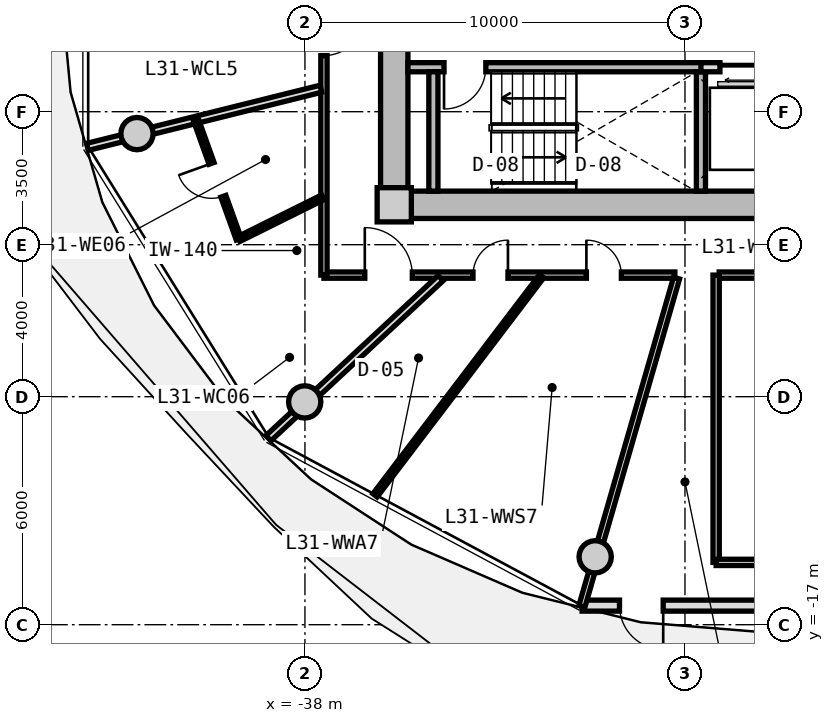
"""IFC4 building model, lengths in metres.
Left out: names, types, materials, properties, quantities, classifications, styles, units other than length and angle.
Written with IfcOpenShell. Run it as: python <this file> out.ifc"""

import sys

from ifc_helpers import new_model, si_unit, direction, frame, frame_2d, origin, origin_2d, place, context, subcontext, project, spatial, rectangle, circle, extrude, source, transform, mapped, element, fill, save


model = new_model("IFC4")
c1 = context("Model", 3, precision=1e-05, world=origin(), true_north=direction((0.0, 1.0)))
c2 = subcontext(c1, "Body", "Model", "MODEL_VIEW")
j1 = project(units=[si_unit("LENGTHUNIT", "METRE"), si_unit("PLANEANGLEUNIT", "RADIAN")], contexts=[c1])
p1 = place(None, origin())
s1 = spatial("IfcSite", under=j1, at=p1, CompositionType="ELEMENT")
p2 = place(p1, origin())
s2 = spatial("IfcBuilding", under=s1, at=p2, CompositionType="ELEMENT")
p3 = place(p2, frame((0.0, 0.0, 102.35)))
s3 = spatial("IfcBuildingStorey", under=s2, at=p3, CompositionType="ELEMENT", Elevation=102.35)
m1 = source(origin(), c2, "Body", "SweptSolid", [
    extrude(rectangle(XDim=0.9, YDim=0.9, at=origin_2d()), origin(), (0.0, 0.0, 1.0), 3.05),
])
p4 = place(p3, frame((-35.65, -5.95, 0.0), z_axis=(0.0, 0.0, 1.0), x_axis=(1.0, 0.0, 0.0)))
e1 = element("IfcColumn", 1, at=p4, inside=s3, PredefinedType="COLUMN", context=c2, shape_type="MappedRepresentation", body=[
    mapped(m1, transform((0.0, 0.0, 0.0), x_axis=(1.0, 0.0, 0.0), y_axis=(0.0, 1.0, 0.0), z_axis=(0.0, 0.0, 1.0), scale=1.0)),
])
m2 = source(origin(), c2, "Body", "SweptSolid", [
    extrude(rectangle(XDim=14.4, YDim=0.72, at=frame_2d((7.2, 0.0))), origin(), (0.0, 0.0, 1.0), 2.79),
])
p5 = place(p3, frame((-20.8, -5.95, 0.0), z_axis=(0.0, 0.0, 1.0), x_axis=(-1.0, 0.0, 0.0)))
e2 = element("IfcWall", 2, at=p5, inside=s3, PredefinedType="SHEAR", context=c2, shape_type="MappedRepresentation", body=[
    mapped(m2, transform((0.0, 0.0, 0.0), x_axis=(1.0, 0.0, 0.0), y_axis=(0.0, 1.0, 0.0), z_axis=(0.0, 0.0, 1.0), scale=1.0)),
])
m3 = source(origin(), c2, "Body", "SweptSolid", [
    extrude(rectangle(XDim=11.0, YDim=0.72, at=frame_2d((5.5, 0.0))), origin(), (0.0, 0.0, 1.0), 2.79),
])
p6 = place(p3, frame((-35.65, -5.5, 0.0), z_axis=(0.0, 0.0, 1.0), x_axis=(0.0, 1.0, 0.0)))
e3 = element("IfcWall", 3, at=p6, inside=s3, PredefinedType="SHEAR", context=c2, shape_type="MappedRepresentation", body=[
    mapped(m3, transform((0.0, 0.0, 0.0), x_axis=(1.0, 0.0, 0.0), y_axis=(0.0, 1.0, 0.0), z_axis=(0.0, 0.0, 1.0), scale=1.0)),
])
p7 = place(p6, frame((3.8, 0.0, 0.0)))
e4 = element("IfcOpeningElement", 4, at=p7, cuts=e3, PredefinedType="OPENING", context=c2, shape_type="SweptSolid", body=[
    extrude(rectangle(XDim=1.2, YDim=2.15, at=frame_2d((0.6, 1.075))), frame((0.0, 0.37, 0.0), z_axis=(0.0, -1.0, 0.0), x_axis=(1.0, 0.0, 0.0)), (0.0, 0.0, 1.0), 0.74),
])
m4 = source(origin(), c2, "Body", "SweptSolid", [
    extrude(circle(Radius=0.425, at=origin_2d()), origin(), (0.0, 0.0, 1.0), 3.05),
])
for number, where, z_axis, x_axis in (
    (5, (-42.419, -4.076, 0.0), (0.0, 0.0, 1.0), (1.0, 0.0, 0.0)),
    (6, (-38.006, -11.137, 0.0), (0.0, 0.0, 1.0), (1.0, 0.0, 0.0)),
    (7, (-30.363, -15.213, 0.0), (0.0, 0.0, 1.0), (1.0, 0.0, 0.0)),
):
    element("IfcColumn", number, at=place(p3, frame(where, z_axis=z_axis, x_axis=x_axis)), inside=s3, PredefinedType="COLUMN", context=c2, shape_type="MappedRepresentation", body=[
        mapped(m4, transform((0.0, 0.0, 0.0), x_axis=(1.0, 0.0, 0.0), y_axis=(0.0, 1.0, 0.0), z_axis=(0.0, 0.0, 1.0), scale=1.0)),
    ])
m5 = source(origin(), c2, "Body", "SweptSolid", [
    extrude(rectangle(XDim=9.514, YDim=0.29, at=frame_2d((4.757, 0.0))), origin(), (0.0, 0.0, 1.0), 2.79),
])
p8 = place(p3, frame((-21.193, -16.498, 0.0), z_axis=(0.0, 0.0, 1.0), x_axis=(-1.0, 0.0, 0.0)))
e8 = element("IfcWall", 8, at=p8, inside=s3, PredefinedType="SOLIDWALL", context=c2, shape_type="MappedRepresentation", body=[
    mapped(m5, transform((0.0, 0.0, 0.0), x_axis=(1.0, 0.0, 0.0), y_axis=(0.0, 1.0, 0.0), z_axis=(0.0, 0.0, 1.0), scale=1.0)),
])
p9 = place(p8, frame((7.38, 0.0, 0.0)))
e9 = element("IfcOpeningElement", 9, at=p9, cuts=e8, PredefinedType="OPENING", context=c2, shape_type="SweptSolid", body=[
    extrude(rectangle(XDim=1.15, YDim=2.25, at=frame_2d((0.575, 1.125))), frame((0.0, 0.155, 0.0), z_axis=(0.0, -1.0, 0.0), x_axis=(1.0, 0.0, 0.0)), (0.0, 0.0, 1.0), 0.31),
])
p10 = place(p8, frame((0.85, 0.0, 0.85)))
e10 = element("IfcOpeningElement", 10, at=p10, cuts=e8, PredefinedType="OPENING", context=c2, shape_type="SweptSolid", body=[
    extrude(rectangle(XDim=1.2, YDim=1.5, at=frame_2d((0.6, 0.75))), frame((0.0, 0.155, 0.0), z_axis=(0.0, -1.0, 0.0), x_axis=(1.0, 0.0, 0.0)), (0.0, 0.0, 1.0), 0.31),
])
m6 = source(origin(), c2, "Body", "SweptSolid", [
    extrude(rectangle(XDim=7.83, YDim=0.24, at=frame_2d((3.915, 0.0))), origin(), (0.0, 0.0, 1.0), 2.79),
])
p11 = place(p3, frame((-35.29, -2.33, 0.0), z_axis=(0.0, 0.0, 1.0), x_axis=(1.0, 0.0, 0.0)))
e11 = element("IfcWall", 11, at=p11, inside=s3, PredefinedType="PARTITIONING", context=c2, shape_type="MappedRepresentation", body=[
    mapped(m6, transform((0.0, 0.0, 0.0), x_axis=(1.0, 0.0, 0.0), y_axis=(0.0, 1.0, 0.0), z_axis=(0.0, 0.0, 1.0), scale=1.0)),
])
p12 = place(p11, frame((0.95, 0.0, 0.0)))
e12 = element("IfcOpeningElement", 12, at=p12, cuts=e11, PredefinedType="OPENING", context=c2, shape_type="SweptSolid", body=[
    extrude(rectangle(XDim=1.1, YDim=2.15, at=frame_2d((0.55, 1.075))), frame((0.0, 0.13, 0.0), z_axis=(0.0, -1.0, 0.0), x_axis=(1.0, 0.0, 0.0)), (0.0, 0.0, 1.0), 0.26),
])
m7 = source(origin(), c2, "Body", "SweptSolid", [
    extrude(rectangle(XDim=3.14, YDim=0.24, at=frame_2d((1.57, 0.0))), origin(), (0.0, 0.0, 1.0), 2.79),
])
for number, where, z_axis, x_axis in (
    (13, (-34.62, -5.59, 0.0), (0.0, 0.0, 1.0), (0.0, 1.0, 0.0)),
    (14, (-27.58, -5.59, 0.0), (0.0, 0.0, 1.0), (0.0, 1.0, 0.0)),
):
    element("IfcWall", number, at=place(p3, frame(where, z_axis=z_axis, x_axis=x_axis)), inside=s3, PredefinedType="PARTITIONING", context=c2, shape_type="MappedRepresentation", body=[
        mapped(m7, transform((0.0, 0.0, 0.0), x_axis=(1.0, 0.0, 0.0), y_axis=(0.0, 1.0, 0.0), z_axis=(0.0, 0.0, 1.0), scale=1.0)),
    ])
m8 = source(origin(), c2, "Body", "SweptSolid", [
    extrude(rectangle(XDim=4.13, YDim=0.24, at=frame_2d((2.065, 0.0))), origin(), (0.0, 0.0, 1.0), 2.775),
])
p13 = place(p3, frame((-27.58, -2.33, 0.0), z_axis=(0.0, 0.0, 1.0), x_axis=(1.0, 0.0, 0.0)))
e15 = element("IfcWall", 15, at=p13, inside=s3, PredefinedType="PARTITIONING", context=c2, shape_type="MappedRepresentation", body=[
    mapped(m8, transform((0.0, 0.0, 0.0), x_axis=(1.0, 0.0, 0.0), y_axis=(0.0, 1.0, 0.0), z_axis=(0.0, 0.0, 1.0), scale=1.0)),
])
p14 = place(p13, frame((0.5, 0.0, 0.0)))
e16 = element("IfcOpeningElement", 16, at=p14, cuts=e15, PredefinedType="OPENING", context=c2, shape_type="SweptSolid", body=[
    extrude(rectangle(XDim=1.1, YDim=2.2, at=frame_2d((0.55, 1.1))), frame((0.0, 0.13, 0.0), z_axis=(0.0, -1.0, 0.0), x_axis=(1.0, 0.0, 0.0)), (0.0, 0.0, 1.0), 0.26),
])
m9 = source(origin(), c2, "Body", "SweptSolid", [
    extrude(rectangle(XDim=8.6, YDim=0.165, at=frame_2d((4.3, 0.0))), origin(), (0.0, 0.0, 1.0), 2.775),
])
p15 = place(p3, frame((-18.5, -7.8, 0.0), z_axis=(0.0, 0.0, 1.0), x_axis=(-1.0, 0.0, 0.0)))
e17 = element("IfcWall", 17, at=p15, inside=s3, PredefinedType="PARTITIONING", context=c2, shape_type="MappedRepresentation", body=[
    mapped(m9, transform((0.0, 0.0, 0.0), x_axis=(1.0, 0.0, 0.0), y_axis=(0.0, 1.0, 0.0), z_axis=(0.0, 0.0, 1.0), scale=1.0)),
])
p16 = place(p15, frame((3.775, 0.0, 0.0)))
e18 = element("IfcOpeningElement", 18, at=p16, cuts=e17, PredefinedType="OPENING", context=c2, shape_type="SweptSolid", body=[
    extrude(rectangle(XDim=1.05, YDim=2.15, at=frame_2d((0.525, 1.075))), frame((0.0, 0.093, 0.0), z_axis=(0.0, -1.0, 0.0), x_axis=(1.0, 0.0, 0.0)), (0.0, 0.0, 1.0), 0.185),
])
m10 = source(origin(), c2, "Body", "SweptSolid", [
    extrude(rectangle(XDim=9.234, YDim=0.165, at=frame_2d((4.617, 0.0))), origin(), (0.0, 0.0, 1.0), 2.775),
])
p17 = place(p3, frame((-28.266, -7.8, 0.0), z_axis=(0.0, 0.0, 1.0), x_axis=(-1.0, 0.0, 0.0)))
e19 = element("IfcWall", 19, at=p17, inside=s3, PredefinedType="PARTITIONING", context=c2, shape_type="MappedRepresentation", body=[
    mapped(m10, transform((0.0, 0.0, 0.0), x_axis=(1.0, 0.0, 0.0), y_axis=(0.0, 1.0, 0.0), z_axis=(0.0, 0.0, 1.0), scale=1.0)),
])
p18 = place(p17, frame((6.909, 0.0, 0.0)))
e20 = element("IfcOpeningElement", 20, at=p18, cuts=e19, PredefinedType="OPENING", context=c2, shape_type="SweptSolid", body=[
    extrude(rectangle(XDim=1.25, YDim=2.2, at=frame_2d((0.625, 1.1))), frame((0.0, 0.093, 0.0), z_axis=(0.0, -1.0, 0.0), x_axis=(1.0, 0.0, 0.0)), (0.0, 0.0, 1.0), 0.185),
])
p19 = place(p17, frame((4.392, 0.0, 0.0)))
e21 = element("IfcOpeningElement", 21, at=p19, cuts=e19, PredefinedType="OPENING", context=c2, shape_type="SweptSolid", body=[
    extrude(rectangle(XDim=0.92, YDim=2.1, at=frame_2d((0.46, 1.05))), frame((0.0, 0.093, 0.0), z_axis=(0.0, -1.0, 0.0), x_axis=(1.0, 0.0, 0.0)), (0.0, 0.0, 1.0), 0.185),
])
p20 = place(p17, frame((1.408, 0.0, 0.0)))
e22 = element("IfcOpeningElement", 22, at=p20, cuts=e19, PredefinedType="OPENING", context=c2, shape_type="SweptSolid", body=[
    extrude(rectangle(XDim=0.92, YDim=2.1, at=frame_2d((0.46, 1.05))), frame((0.0, 0.093, 0.0), z_axis=(0.0, -1.0, 0.0), x_axis=(1.0, 0.0, 0.0)), (0.0, 0.0, 1.0), 0.185),
])
m11 = source(origin(), c2, "Body", "SweptSolid", [
    extrude(rectangle(XDim=15.6, YDim=0.165, at=frame_2d((7.8, 0.0))), origin(), (0.0, 0.0, 1.0), 2.775),
])
p21 = place(p3, frame((-37.5, -7.8, 0.0), z_axis=(0.0, 0.0, 1.0), x_axis=(0.0, 1.0, 0.0)))
e23 = element("IfcWall", 23, at=p21, inside=s3, PredefinedType="PARTITIONING", context=c2, shape_type="MappedRepresentation", body=[
    mapped(m11, transform((0.0, 0.0, 0.0), x_axis=(1.0, 0.0, 0.0), y_axis=(0.0, 1.0, 0.0), z_axis=(0.0, 0.0, 1.0), scale=1.0)),
])
p22 = place(p21, frame((11.994, 0.0, 0.0)))
e24 = element("IfcOpeningElement", 24, at=p22, cuts=e23, PredefinedType="OPENING", context=c2, shape_type="SweptSolid", body=[
    extrude(rectangle(XDim=1.25, YDim=2.2, at=frame_2d((0.625, 1.1))), frame((0.0, 0.093, 0.0), z_axis=(0.0, -1.0, 0.0), x_axis=(1.0, 0.0, 0.0)), (0.0, 0.0, 1.0), 0.185),
])
p23 = place(p21, frame((7.984, 0.0, 0.0)))
e25 = element("IfcOpeningElement", 25, at=p23, cuts=e23, PredefinedType="OPENING", context=c2, shape_type="SweptSolid", body=[
    extrude(rectangle(XDim=1.05, YDim=2.15, at=frame_2d((0.525, 1.075))), frame((0.0, 0.093, 0.0), z_axis=(0.0, -1.0, 0.0), x_axis=(1.0, 0.0, 0.0)), (0.0, 0.0, 1.0), 0.185),
])
p24 = place(p21, frame((5.777, 0.0, 0.0)))
e26 = element("IfcOpeningElement", 26, at=p24, cuts=e23, PredefinedType="OPENING", context=c2, shape_type="SweptSolid", body=[
    extrude(rectangle(XDim=1.05, YDim=2.15, at=frame_2d((0.525, 1.075))), frame((0.0, 0.093, 0.0), z_axis=(0.0, -1.0, 0.0), x_axis=(1.0, 0.0, 0.0)), (0.0, 0.0, 1.0), 0.185),
])
m12 = source(origin(), c2, "Body", "SweptSolid", [
    extrude(rectangle(XDim=8.989, YDim=0.165, at=frame_2d((4.495, 0.0))), origin(), (0.0, 0.0, 1.0), 2.275),
])
p25 = place(p3, frame((-28.222, -7.88, 0.0), z_axis=(0.0, 0.0, 1.0), x_axis=(-0.27702323008, -0.960863221274, 0.0)))
e27 = element("IfcWall", 27, at=p25, inside=s3, PredefinedType="PARTITIONING", context=c2, shape_type="MappedRepresentation", body=[
    mapped(m12, transform((0.0, 0.0, 0.0), x_axis=(1.0, 0.0, 0.0), y_axis=(0.0, 1.0, 0.0), z_axis=(0.0, 0.0, 1.0), scale=1.0)),
])
m13 = source(origin(), c2, "Body", "SweptSolid", [
    extrude(rectangle(XDim=7.56, YDim=0.165, at=frame_2d((3.78, 0.0))), origin(), (0.0, 0.0, 1.0), 2.775),
])
p26 = place(p3, frame((-27.18, -15.36, 0.0), z_axis=(0.0, 0.0, 1.0), x_axis=(0.0, 1.0, 0.0)))
e28 = element("IfcWall", 28, at=p26, inside=s3, PredefinedType="PARTITIONING", context=c2, shape_type="MappedRepresentation", body=[
    mapped(m13, transform((0.0, 0.0, 0.0), x_axis=(1.0, 0.0, 0.0), y_axis=(0.0, 1.0, 0.0), z_axis=(0.0, 0.0, 1.0), scale=1.0)),
])
m14 = source(origin(), c2, "Body", "SweptSolid", [
    extrude(rectangle(XDim=8.407, YDim=0.165, at=frame_2d((4.204, 0.0))), origin(), (0.0, 0.0, 1.0), 2.275),
])
p27 = place(p3, frame((-27.18, -15.36, 0.0), z_axis=(0.0, 0.0, 1.0), x_axis=(1.0, 0.0, 0.0)))
e29 = element("IfcWall", 29, at=p27, inside=s3, PredefinedType="PARTITIONING", context=c2, shape_type="MappedRepresentation", body=[
    mapped(m14, transform((0.0, 0.0, 0.0), x_axis=(1.0, 0.0, 0.0), y_axis=(0.0, 1.0, 0.0), z_axis=(0.0, 0.0, 1.0), scale=1.0)),
])
m15 = source(origin(), c2, "Body", "SweptSolid", [
    extrude(rectangle(XDim=6.331, YDim=0.19, at=frame_2d((3.165, 0.0))), origin(), (0.0, 0.0, 1.0), 2.275),
])
p28 = place(p3, frame((-37.58, -2.896, 0.0), z_axis=(0.0, 0.0, 1.0), x_axis=(-0.97036440661, -0.241646267062, 0.0)))
e30 = element("IfcWall", 30, at=p28, inside=s3, PredefinedType="PARTITIONING", context=c2, shape_type="MappedRepresentation", body=[
    mapped(m15, transform((0.0, 0.0, 0.0), x_axis=(1.0, 0.0, 0.0), y_axis=(0.0, 1.0, 0.0), z_axis=(0.0, 0.0, 1.0), scale=1.0)),
])
m16 = source(origin(), c2, "Body", "SweptSolid", [
    extrude(rectangle(XDim=6.187, YDim=0.19, at=frame_2d((3.093, 0.0))), origin(), (0.0, 0.0, 1.0), 2.275),
])
p29 = place(p3, frame((-34.429, -7.88, 0.0), z_axis=(0.0, 0.0, 1.0), x_axis=(-0.732501077882, -0.680765870841, 0.0)))
e31 = element("IfcWall", 31, at=p29, inside=s3, PredefinedType="PARTITIONING", context=c2, shape_type="MappedRepresentation", body=[
    mapped(m16, transform((0.0, 0.0, 0.0), x_axis=(1.0, 0.0, 0.0), y_axis=(0.0, 1.0, 0.0), z_axis=(0.0, 0.0, 1.0), scale=1.0)),
])
m17 = source(origin(), c2, "Body", "SweptSolid", [
    extrude(rectangle(XDim=2.469, YDim=0.14, at=frame_2d((1.235, 0.0))), origin(), (0.0, 0.0, 1.0), 2.775),
])
p30 = place(p3, frame((-37.53, -5.754, 0.0), z_axis=(0.0, 0.0, 1.0), x_axis=(-0.895512172456, -0.445037019789, 0.0)))
e32 = element("IfcWall", 32, at=p30, inside=s3, PredefinedType="PARTITIONING", context=c2, shape_type="MappedRepresentation", body=[
    mapped(m17, transform((0.0, 0.0, 0.0), x_axis=(1.0, 0.0, 0.0), y_axis=(0.0, 1.0, 0.0), z_axis=(0.0, 0.0, 1.0), scale=1.0)),
])
m18 = source(origin(), c2, "Body", "SweptSolid", [
    extrude(rectangle(XDim=3.314, YDim=0.14, at=frame_2d((1.657, 0.0))), origin(), (0.0, 0.0, 1.0), 2.775),
])
p31 = place(p3, frame((-39.741, -6.853, 0.0), z_axis=(0.0, 0.0, 1.0), x_axis=(-0.338067217654, 0.941121966776, 0.0)))
e33 = element("IfcWall", 33, at=p31, inside=s3, PredefinedType="PARTITIONING", context=c2, shape_type="MappedRepresentation", body=[
    mapped(m18, transform((0.0, 0.0, 0.0), x_axis=(1.0, 0.0, 0.0), y_axis=(0.0, 1.0, 0.0), z_axis=(0.0, 0.0, 1.0), scale=1.0)),
])
p32 = place(p31, frame((1.197, 0.0, 0.0)))
e34 = element("IfcOpeningElement", 34, at=p32, cuts=e33, PredefinedType="OPENING", context=c2, shape_type="SweptSolid", body=[
    extrude(rectangle(XDim=0.92, YDim=2.1, at=frame_2d((0.46, 1.05))), frame((0.0, 0.08, 0.0), z_axis=(0.0, -1.0, 0.0), x_axis=(1.0, 0.0, 0.0)), (0.0, 0.0, 1.0), 0.16),
])
m19 = source(origin(), c2, "Body", "SweptSolid", [
    extrude(rectangle(XDim=7.243, YDim=0.14, at=frame_2d((3.621, 0.0))), origin(), (0.0, 0.0, 1.0), 2.775),
])
p33 = place(p3, frame((-31.774, -7.83, 0.0), z_axis=(0.0, 0.0, 1.0), x_axis=(-0.605111472002, -0.796140757939, 0.0)))
e35 = element("IfcWall", 35, at=p33, inside=s3, PredefinedType="PARTITIONING", context=c2, shape_type="MappedRepresentation", body=[
    mapped(m19, transform((0.0, 0.0, 0.0), x_axis=(1.0, 0.0, 0.0), y_axis=(0.0, 1.0, 0.0), z_axis=(0.0, 0.0, 1.0), scale=1.0)),
])
m20 = source(origin(), c2, "Body", "SweptSolid", [
    extrude(rectangle(XDim=1.15, YDim=2.25, at=frame_2d((0.575, 1.125))), frame((0.0, 0.025, 0.0), z_axis=(0.0, -1.0, 0.0), x_axis=(1.0, 0.0, 0.0)), (0.0, 0.0, 1.0), 0.05),
])
p34 = place(p9, origin())
e36 = element("IfcDoor", 36, at=p34, inside=s3, OperationType="SINGLE_SWING_LEFT", PredefinedType="DOOR", context=c2, shape_type="MappedRepresentation", body=[
    mapped(m20, transform((0.0, 0.0, 0.0), x_axis=(1.0, 0.0, 0.0), y_axis=(0.0, 1.0, 0.0), z_axis=(0.0, 0.0, 1.0), scale=1.0)),
])
fill(e9, e36)
m21 = source(origin(), c2, "Body", "SweptSolid", [
    extrude(rectangle(XDim=1.1, YDim=2.15, at=frame_2d((0.55, 1.075))), frame((0.0, 0.025, 0.0), z_axis=(0.0, -1.0, 0.0), x_axis=(1.0, 0.0, 0.0)), (0.0, 0.0, 1.0), 0.05),
])
p35 = place(p12, frame((1.1, 0.0, 0.0), z_axis=(0.0, 0.0, 1.0), x_axis=(-1.0, 0.0, 0.0)))
e37 = element("IfcDoor", 37, at=p35, inside=s3, OperationType="SINGLE_SWING_RIGHT", PredefinedType="DOOR", context=c2, shape_type="MappedRepresentation", body=[
    mapped(m21, transform((0.0, 0.0, 0.0), x_axis=(1.0, 0.0, 0.0), y_axis=(0.0, 1.0, 0.0), z_axis=(0.0, 0.0, 1.0), scale=1.0)),
])
fill(e12, e37)
m22 = source(origin(), c2, "Body", "SweptSolid", [
    extrude(rectangle(XDim=1.1, YDim=2.2, at=frame_2d((0.55, 1.1))), frame((0.0, 0.025, 0.0), z_axis=(0.0, -1.0, 0.0), x_axis=(1.0, 0.0, 0.0)), (0.0, 0.0, 1.0), 0.05),
])
p36 = place(p14, frame((1.1, 0.0, 0.0), z_axis=(0.0, 0.0, 1.0), x_axis=(-1.0, 0.0, 0.0)))
e38 = element("IfcDoor", 38, at=p36, inside=s3, OperationType="SLIDING_TO_LEFT", PredefinedType="DOOR", context=c2, shape_type="MappedRepresentation", body=[
    mapped(m22, transform((0.0, 0.0, 0.0), x_axis=(1.0, 0.0, 0.0), y_axis=(0.0, 1.0, 0.0), z_axis=(0.0, 0.0, 1.0), scale=1.0)),
])
fill(e16, e38)
m23 = source(origin(), c2, "Body", "SweptSolid", [
    extrude(rectangle(XDim=1.05, YDim=2.15, at=frame_2d((0.525, 1.075))), frame((0.0, 0.025, 0.0), z_axis=(0.0, -1.0, 0.0), x_axis=(1.0, 0.0, 0.0)), (0.0, 0.0, 1.0), 0.05),
])
p37 = place(p24, frame((1.05, 0.0, 0.0), z_axis=(0.0, 0.0, 1.0), x_axis=(-1.0, 0.0, 0.0)))
e39 = element("IfcDoor", 39, at=p37, inside=s3, OperationType="SINGLE_SWING_LEFT", PredefinedType="DOOR", context=c2, shape_type="MappedRepresentation", body=[
    mapped(m23, transform((0.0, 0.0, 0.0), x_axis=(1.0, 0.0, 0.0), y_axis=(0.0, 1.0, 0.0), z_axis=(0.0, 0.0, 1.0), scale=1.0)),
])
fill(e26, e39)
m24 = source(origin(), c2, "Body", "SweptSolid", [
    extrude(rectangle(XDim=1.25, YDim=2.2, at=frame_2d((0.625, 1.1))), frame((0.0, 0.025, 0.0), z_axis=(0.0, -1.0, 0.0), x_axis=(1.0, 0.0, 0.0)), (0.0, 0.0, 1.0), 0.05),
])
p38 = place(p18, frame((1.25, 0.0, 0.0), z_axis=(0.0, 0.0, 1.0), x_axis=(-1.0, 0.0, 0.0)))
e40 = element("IfcDoor", 40, at=p38, inside=s3, OperationType="SINGLE_SWING_LEFT", PredefinedType="DOOR", context=c2, shape_type="MappedRepresentation", body=[
    mapped(m24, transform((0.0, 0.0, 0.0), x_axis=(1.0, 0.0, 0.0), y_axis=(0.0, 1.0, 0.0), z_axis=(0.0, 0.0, 1.0), scale=1.0)),
])
fill(e20, e40)
m25 = source(origin(), c2, "Body", "SweptSolid", [
    extrude(rectangle(XDim=0.92, YDim=2.1, at=frame_2d((0.46, 1.05))), frame((0.0, 0.025, 0.0), z_axis=(0.0, -1.0, 0.0), x_axis=(1.0, 0.0, 0.0)), (0.0, 0.0, 1.0), 0.05),
])
p39 = place(p32, origin())
e41 = element("IfcDoor", 41, at=p39, inside=s3, OperationType="SINGLE_SWING_RIGHT", PredefinedType="DOOR", context=c2, shape_type="MappedRepresentation", body=[
    mapped(m25, transform((0.0, 0.0, 0.0), x_axis=(1.0, 0.0, 0.0), y_axis=(0.0, 1.0, 0.0), z_axis=(0.0, 0.0, 1.0), scale=1.0)),
])
fill(e34, e41)
p40 = place(p19, frame((0.92, 0.0, 0.0), z_axis=(0.0, 0.0, 1.0), x_axis=(-1.0, 0.0, 0.0)))
e42 = element("IfcDoor", 42, at=p40, inside=s3, OperationType="SINGLE_SWING_RIGHT", PredefinedType="DOOR", context=c2, shape_type="MappedRepresentation", body=[
    mapped(m25, transform((0.0, 0.0, 0.0), x_axis=(1.0, 0.0, 0.0), y_axis=(0.0, 1.0, 0.0), z_axis=(0.0, 0.0, 1.0), scale=1.0)),
])
fill(e21, e42)
p41 = place(p20, frame((0.92, 0.0, 0.0), z_axis=(0.0, 0.0, 1.0), x_axis=(-1.0, 0.0, 0.0)))
e43 = element("IfcDoor", 43, at=p41, inside=s3, OperationType="SINGLE_SWING_LEFT", PredefinedType="DOOR", context=c2, shape_type="MappedRepresentation", body=[
    mapped(m25, transform((0.0, 0.0, 0.0), x_axis=(1.0, 0.0, 0.0), y_axis=(0.0, 1.0, 0.0), z_axis=(0.0, 0.0, 1.0), scale=1.0)),
])
fill(e22, e43)
save(model, sys.argv[1])
